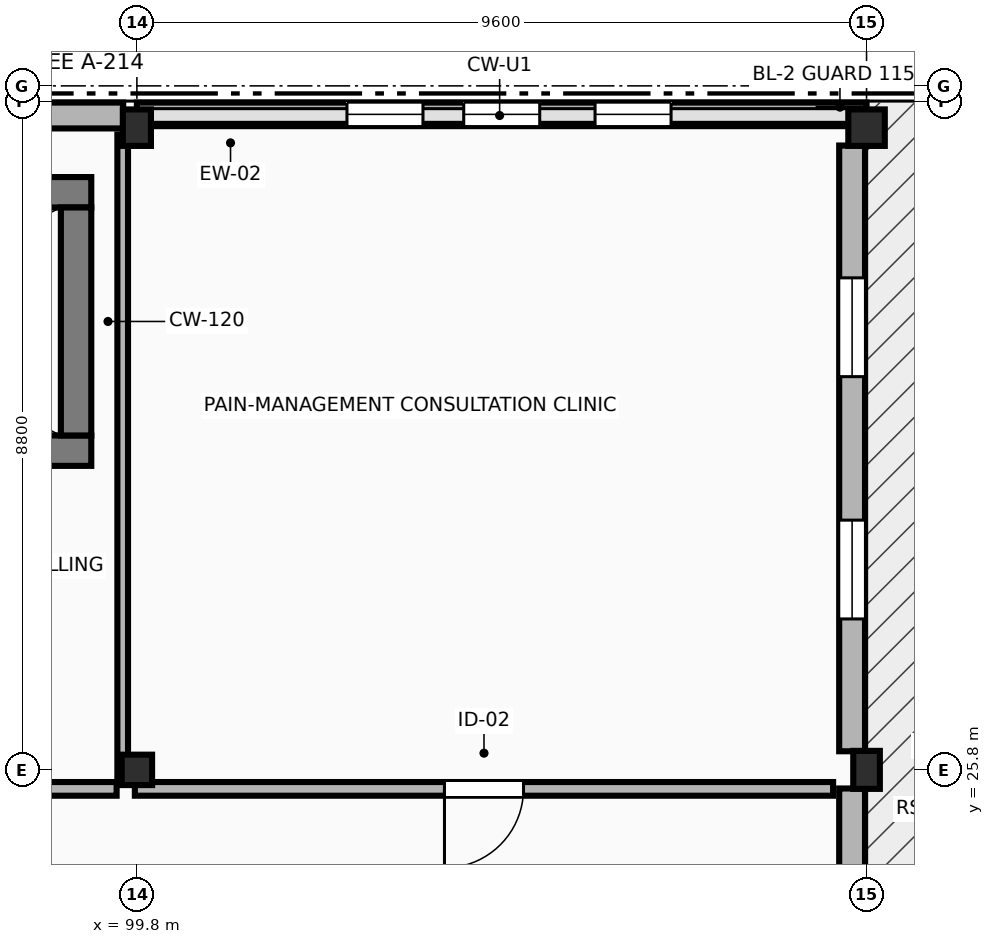
"""IFC4 building model, lengths in metres.
Left out: names, types, materials, properties, quantities, classifications, styles, units other than length and angle.
Written with IfcOpenShell. Run it as: python <this file> out.ifc"""

import sys

from ifc_helpers import new_model, si_unit, direction, frame, frame_2d, origin, origin_2d, place, context, subcontext, project, spatial, polyline, rectangle, outline, extrude, element, fill, save


model = new_model("IFC4")
c1 = context("Model", 3, precision=1e-05, world=origin(), true_north=direction((0.0, 1.0)))
c2 = subcontext(c1, "Body", "Model", "MODEL_VIEW")
j1 = project(units=[si_unit("LENGTHUNIT", "METRE"), si_unit("PLANEANGLEUNIT", "RADIAN")], contexts=[c1])
p1 = place(None, origin())
s1 = spatial("IfcSite", under=j1, at=p1, CompositionType="ELEMENT")
p2 = place(p1, origin())
s2 = spatial("IfcBuilding", under=s1, at=p2, CompositionType="ELEMENT")
p3 = place(p2, frame((0.0, 0.0, 18.0)))
s3 = spatial("IfcBuildingStorey", under=s2, at=p3, CompositionType="ELEMENT", Elevation=18.0)
p4 = place(p3, frame((99.8, 25.8, 0.0), z_axis=(0.0, 0.0, 1.0), x_axis=(1.0, 0.0, 0.0)))
e1 = element("IfcColumn", 1, at=p4, inside=s3, PredefinedType="COLUMN", context=c2, shape_type="SweptSolid", body=[
    extrude(rectangle(XDim=0.4, YDim=0.4, at=origin_2d()), origin(), (0.0, 0.0, 1.0), 4.2),
])
p5 = place(p3, frame((99.8, 34.25, 0.0), z_axis=(0.0, 0.0, 1.0), x_axis=(1.0, 0.0, 0.0)))
e2 = element("IfcColumn", 2, at=p5, inside=s3, PredefinedType="COLUMN", context=c2, shape_type="SweptSolid", body=[
    extrude(rectangle(XDim=0.37, YDim=0.48, at=origin_2d()), origin(), (0.0, 0.0, 1.0), 4.2),
])
p6 = place(p3, frame((109.4, 25.8, 0.0), z_axis=(0.0, 0.0, 1.0), x_axis=(1.0, 0.0, 0.0)))
e3 = element("IfcColumn", 3, at=p6, inside=s3, PredefinedType="COLUMN", context=c2, shape_type="SweptSolid", body=[
    extrude(rectangle(XDim=0.35, YDim=0.5, at=origin_2d()), origin(), (0.0, 0.0, 1.0), 4.2),
])
p7 = place(p3, frame((109.4, 34.25, 0.0), z_axis=(0.0, 0.0, 1.0), x_axis=(1.0, 0.0, 0.0)))
e4 = element("IfcColumn", 4, at=p7, inside=s3, PredefinedType="COLUMN", context=c2, shape_type="SweptSolid", body=[
    extrude(rectangle(XDim=0.48, YDim=0.48, at=origin_2d()), origin(), (0.0, 0.0, 1.0), 4.2),
])
p8 = place(p3, frame((109.21, 17.36, 0.0), z_axis=(0.0, 0.0, 1.0), x_axis=(0.0, 1.0, 0.0)))
e5 = element("IfcWall", 5, at=p8, inside=s3, PredefinedType="STANDARD", context=c2, shape_type="SweptSolid", body=[
    extrude(rectangle(XDim=8.195, YDim=0.34, at=frame_2d((4.097, 0.0))), origin(), (0.0, 0.0, 1.0), 3.035),
])
p9 = place(p8, frame((1.908, 0.0, 1.15)))
e6 = element("IfcOpeningElement", 6, at=p9, cuts=e5, PredefinedType="OPENING", context=c2, shape_type="SweptSolid", body=[
    extrude(rectangle(XDim=1.1, YDim=1.1, at=frame_2d((0.55, 0.55))), frame((0.0, 0.18, 0.0), z_axis=(0.0, -1.0, 0.0), x_axis=(1.0, 0.0, 0.0)), (0.0, 0.0, 1.0), 0.36),
])
p10 = place(p8, frame((5.187, 0.0, 1.15)))
e7 = element("IfcOpeningElement", 7, at=p10, cuts=e5, PredefinedType="OPENING", context=c2, shape_type="SweptSolid", body=[
    extrude(rectangle(XDim=1.1, YDim=1.1, at=frame_2d((0.55, 0.55))), frame((0.0, 0.18, 0.0), z_axis=(0.0, -1.0, 0.0), x_axis=(1.0, 0.0, 0.0)), (0.0, 0.0, 1.0), 0.36),
])
p11 = place(p3, frame((109.21, 26.045, 0.0), z_axis=(0.0, 0.0, 1.0), x_axis=(0.0, 1.0, 0.0)))
e8 = element("IfcWall", 8, at=p11, inside=s3, PredefinedType="STANDARD", context=c2, shape_type="SweptSolid", body=[
    extrude(rectangle(XDim=7.97, YDim=0.34, at=frame_2d((3.985, 0.0))), origin(), (0.0, 0.0, 1.0), 3.035),
])
p12 = place(p11, frame((1.741, 0.0, 1.15)))
e9 = element("IfcOpeningElement", 9, at=p12, cuts=e8, PredefinedType="OPENING", context=c2, shape_type="SweptSolid", body=[
    extrude(rectangle(XDim=1.3, YDim=1.3, at=frame_2d((0.65, 0.65))), frame((0.0, 0.18, 0.0), z_axis=(0.0, -1.0, 0.0), x_axis=(1.0, 0.0, 0.0)), (0.0, 0.0, 1.0), 0.36),
])
p13 = place(p11, frame((4.929, 0.0, 1.15)))
e10 = element("IfcOpeningElement", 10, at=p13, cuts=e8, PredefinedType="OPENING", context=c2, shape_type="SweptSolid", body=[
    extrude(rectangle(XDim=1.3, YDim=1.3, at=frame_2d((0.65, 0.65))), frame((0.0, 0.18, 0.0), z_axis=(0.0, -1.0, 0.0), x_axis=(1.0, 0.0, 0.0)), (0.0, 0.0, 1.0), 0.36),
])
p14 = place(p3, frame((99.62, 34.41, 0.0), z_axis=(0.0, 0.0, 1.0), x_axis=(-1.0, 0.0, 0.0)))
e11 = element("IfcWall", 11, at=p14, inside=s3, PredefinedType="STANDARD", context=c2, shape_type="SweptSolid", body=[
    extrude(rectangle(XDim=9.24, YDim=0.34, at=frame_2d((4.62, 0.0))), origin(), (0.0, 0.0, 1.0), 3.205),
])
p15 = place(p14, frame((3.645, 0.0, 0.95)))
e12 = element("IfcOpeningElement", 12, at=p15, cuts=e11, PredefinedType="OPENING", context=c2, shape_type="SweptSolid", body=[
    extrude(rectangle(XDim=1.95, YDim=1.55, at=frame_2d((0.975, 0.775))), frame((0.0, 0.18, 0.0), z_axis=(0.0, -1.0, 0.0), x_axis=(1.0, 0.0, 0.0)), (0.0, 0.0, 1.0), 0.36),
])
p16 = place(p3, frame((109.4, 34.425, 4.2), z_axis=(0.0, 0.0, 1.0), x_axis=(-1.0, 0.0, 0.0)))
e13 = element("IfcWall", 13, at=p16, inside=s3, PredefinedType="STANDARD", context=c2, shape_type="SweptSolid", body=[
    extrude(outline(polyline([(0.0, 0.0), (9.6, 0.0), (9.6, 0.0), (4.8, 8.19), (0.0, 0.0), (0.0, 0.0)])), frame((0.0, 0.155, 0.0), z_axis=(0.0, -1.0, 0.0), x_axis=(1.0, 0.0, 0.0)), (0.0, 0.0, 1.0), 0.31),
])
p17 = place(p16, frame((2.572, 0.0, 0.75)))
e14 = element("IfcOpeningElement", 14, at=p17, cuts=e13, PredefinedType="OPENING", context=c2, shape_type="SweptSolid", body=[
    extrude(rectangle(XDim=1.0, YDim=1.0, at=frame_2d((0.5, 0.5))), frame((0.0, 0.165, 0.0), z_axis=(0.0, -1.0, 0.0), x_axis=(1.0, 0.0, 0.0)), (0.0, 0.0, 1.0), 0.33),
])
p18 = place(p16, frame((5.836, 0.0, 1.55)))
e15 = element("IfcOpeningElement", 15, at=p18, cuts=e13, PredefinedType="OPENING", context=c2, shape_type="SweptSolid", body=[
    extrude(rectangle(XDim=1.0, YDim=1.0, at=frame_2d((0.5, 0.5))), frame((0.0, 0.165, 0.0), z_axis=(0.0, -1.0, 0.0), x_axis=(1.0, 0.0, 0.0)), (0.0, 0.0, 1.0), 0.33),
])
p19 = place(p16, frame((4.3, 0.0, 3.35)))
e16 = element("IfcOpeningElement", 16, at=p19, cuts=e13, PredefinedType="OPENING", context=c2, shape_type="SweptSolid", body=[
    extrude(rectangle(XDim=1.0, YDim=1.0, at=frame_2d((0.5, 0.5))), frame((0.0, 0.165, 0.0), z_axis=(0.0, -1.0, 0.0), x_axis=(1.0, 0.0, 0.0)), (0.0, 0.0, 1.0), 0.33),
])
p20 = place(p3, frame((90.8, 30.0, 0.0), z_axis=(0.0, 0.0, 1.0), x_axis=(1.0, 0.0, 0.0)))
e17 = element("IfcWall", 17, at=p20, inside=s3, PredefinedType="SHEAR", context=c2, shape_type="SweptSolid", body=[
    extrude(rectangle(XDim=8.4, YDim=0.4, at=frame_2d((4.2, 0.0))), origin(), (0.0, 0.0, 1.0), 3.94),
])
p21 = place(p20, frame((0.52, 0.0, 0.0)))
e18 = element("IfcOpeningElement", 18, at=p21, cuts=e17, PredefinedType="OPENING", context=c2, shape_type="SweptSolid", body=[
    extrude(rectangle(XDim=1.25, YDim=2.2, at=frame_2d((0.625, 1.1))), frame((0.0, 0.21, 0.0), z_axis=(0.0, -1.0, 0.0), x_axis=(1.0, 0.0, 0.0)), (0.0, 0.0, 1.0), 0.42),
])
p22 = place(p3, frame((99.2, 33.4, 0.0), z_axis=(0.0, 0.0, 1.0), x_axis=(-1.0, 0.0, 0.0)))
e19 = element("IfcWall", 19, at=p22, inside=s3, PredefinedType="SHEAR", context=c2, shape_type="SweptSolid", body=[
    extrude(rectangle(XDim=8.4, YDim=0.4, at=frame_2d((4.2, 0.0))), origin(), (0.0, 0.0, 1.0), 3.94),
])
p23 = place(p3, frame((99.0, 33.2, 0.0), z_axis=(0.0, 0.0, 1.0), x_axis=(0.0, -1.0, 0.0)))
e20 = element("IfcWall", 20, at=p23, inside=s3, PredefinedType="SHEAR", context=c2, shape_type="SweptSolid", body=[
    extrude(rectangle(XDim=3.0, YDim=0.4, at=frame_2d((1.5, 0.0))), origin(), (0.0, 0.0, 1.0), 3.94),
])
p24 = place(p3, frame((99.613, 34.16, 0.0), z_axis=(0.0, 0.0, 1.0), x_axis=(0.0, -1.0, 0.0)))
e21 = element("IfcWall", 21, at=p24, inside=s3, PredefinedType="PARTITIONING", context=c2, shape_type="SweptSolid", body=[
    extrude(rectangle(XDim=8.53, YDim=0.14, at=frame_2d((4.265, 0.0))), origin(), (0.0, 0.0, 1.0), 2.985),
])
p25 = place(p3, frame((99.533, 25.55, 0.0), z_axis=(0.0, 0.0, 1.0), x_axis=(-1.0, 0.0, 0.0)))
e22 = element("IfcWall", 22, at=p25, inside=s3, PredefinedType="PARTITIONING", context=c2, shape_type="SweptSolid", body=[
    extrude(rectangle(XDim=4.433, YDim=0.18, at=frame_2d((2.217, 0.0))), origin(), (0.0, 0.0, 1.0), 3.245),
])
p26 = place(p25, frame((1.717, 0.0, 0.0)))
e23 = element("IfcOpeningElement", 23, at=p26, cuts=e22, PredefinedType="OPENING", context=c2, shape_type="SweptSolid", body=[
    extrude(rectangle(XDim=1.0, YDim=2.15, at=frame_2d((0.5, 1.075))), frame((0.0, 0.1, 0.0), z_axis=(0.0, -1.0, 0.0), x_axis=(1.0, 0.0, 0.0)), (0.0, 0.0, 1.0), 0.2),
])
p27 = place(p3, frame((108.96, 25.55, 0.0), z_axis=(0.0, 0.0, 1.0), x_axis=(-1.0, 0.0, 0.0)))
e24 = element("IfcWall", 24, at=p27, inside=s3, PredefinedType="PARTITIONING", context=c2, shape_type="SweptSolid", body=[
    extrude(rectangle(XDim=9.187, YDim=0.18, at=frame_2d((4.593, 0.0))), origin(), (0.0, 0.0, 1.0), 3.94),
])
p28 = place(p27, frame((4.073, 0.0, 0.0)))
e25 = element("IfcOpeningElement", 25, at=p28, cuts=e24, PredefinedType="OPENING", context=c2, shape_type="SweptSolid", body=[
    extrude(rectangle(XDim=1.04, YDim=2.15, at=frame_2d((0.52, 1.075))), frame((0.0, 0.1, 0.0), z_axis=(0.0, -1.0, 0.0), x_axis=(1.0, 0.0, 0.0)), (0.0, 0.0, 1.0), 0.2),
])
p29 = place(p12, origin())
e26 = element("IfcWindow", 26, at=p29, inside=s3, PartitioningType="SINGLE_PANEL", PredefinedType="WINDOW", context=c2, shape_type="SweptSolid", body=[
    extrude(rectangle(XDim=1.3, YDim=1.3, at=frame_2d((0.65, 0.65))), frame((0.0, 0.03, 0.0), z_axis=(0.0, -1.0, 0.0), x_axis=(1.0, 0.0, 0.0)), (0.0, 0.0, 1.0), 0.06),
])
fill(e9, e26)
p30 = place(p13, origin())
e27 = element("IfcWindow", 27, at=p30, inside=s3, PartitioningType="SINGLE_PANEL", PredefinedType="WINDOW", context=c2, shape_type="SweptSolid", body=[
    extrude(rectangle(XDim=1.3, YDim=1.3, at=frame_2d((0.65, 0.65))), frame((0.0, 0.03, 0.0), z_axis=(0.0, -1.0, 0.0), x_axis=(1.0, 0.0, 0.0)), (0.0, 0.0, 1.0), 0.06),
])
fill(e10, e27)
p31 = place(p17, origin())
e28 = element("IfcWindow", 28, at=p31, inside=s3, PartitioningType="SINGLE_PANEL", PredefinedType="WINDOW", context=c2, shape_type="SweptSolid", body=[
    extrude(rectangle(XDim=1.0, YDim=1.0, at=frame_2d((0.5, 0.5))), frame((0.0, 0.03, 0.0), z_axis=(0.0, -1.0, 0.0), x_axis=(1.0, 0.0, 0.0)), (0.0, 0.0, 1.0), 0.06),
])
fill(e14, e28)
p32 = place(p18, origin())
e29 = element("IfcWindow", 29, at=p32, inside=s3, PartitioningType="SINGLE_PANEL", PredefinedType="WINDOW", context=c2, shape_type="SweptSolid", body=[
    extrude(rectangle(XDim=1.0, YDim=1.0, at=frame_2d((0.5, 0.5))), frame((0.0, 0.03, 0.0), z_axis=(0.0, -1.0, 0.0), x_axis=(1.0, 0.0, 0.0)), (0.0, 0.0, 1.0), 0.06),
])
fill(e15, e29)
p33 = place(p19, origin())
e30 = element("IfcWindow", 30, at=p33, inside=s3, PartitioningType="SINGLE_PANEL", PredefinedType="WINDOW", context=c2, shape_type="SweptSolid", body=[
    extrude(rectangle(XDim=1.0, YDim=1.0, at=frame_2d((0.5, 0.5))), frame((0.0, 0.03, 0.0), z_axis=(0.0, -1.0, 0.0), x_axis=(1.0, 0.0, 0.0)), (0.0, 0.0, 1.0), 0.06),
])
fill(e16, e30)
p34 = place(p28, origin())
e31 = element("IfcDoor", 31, at=p34, inside=s3, OperationType="SINGLE_SWING_RIGHT", PredefinedType="DOOR", context=c2, shape_type="SweptSolid", body=[
    extrude(rectangle(XDim=1.04, YDim=2.15, at=frame_2d((0.52, 1.075))), frame((0.0, 0.025, 0.0), z_axis=(0.0, -1.0, 0.0), x_axis=(1.0, 0.0, 0.0)), (0.0, 0.0, 1.0), 0.05),
])
fill(e25, e31)
save(model, sys.argv[1])
